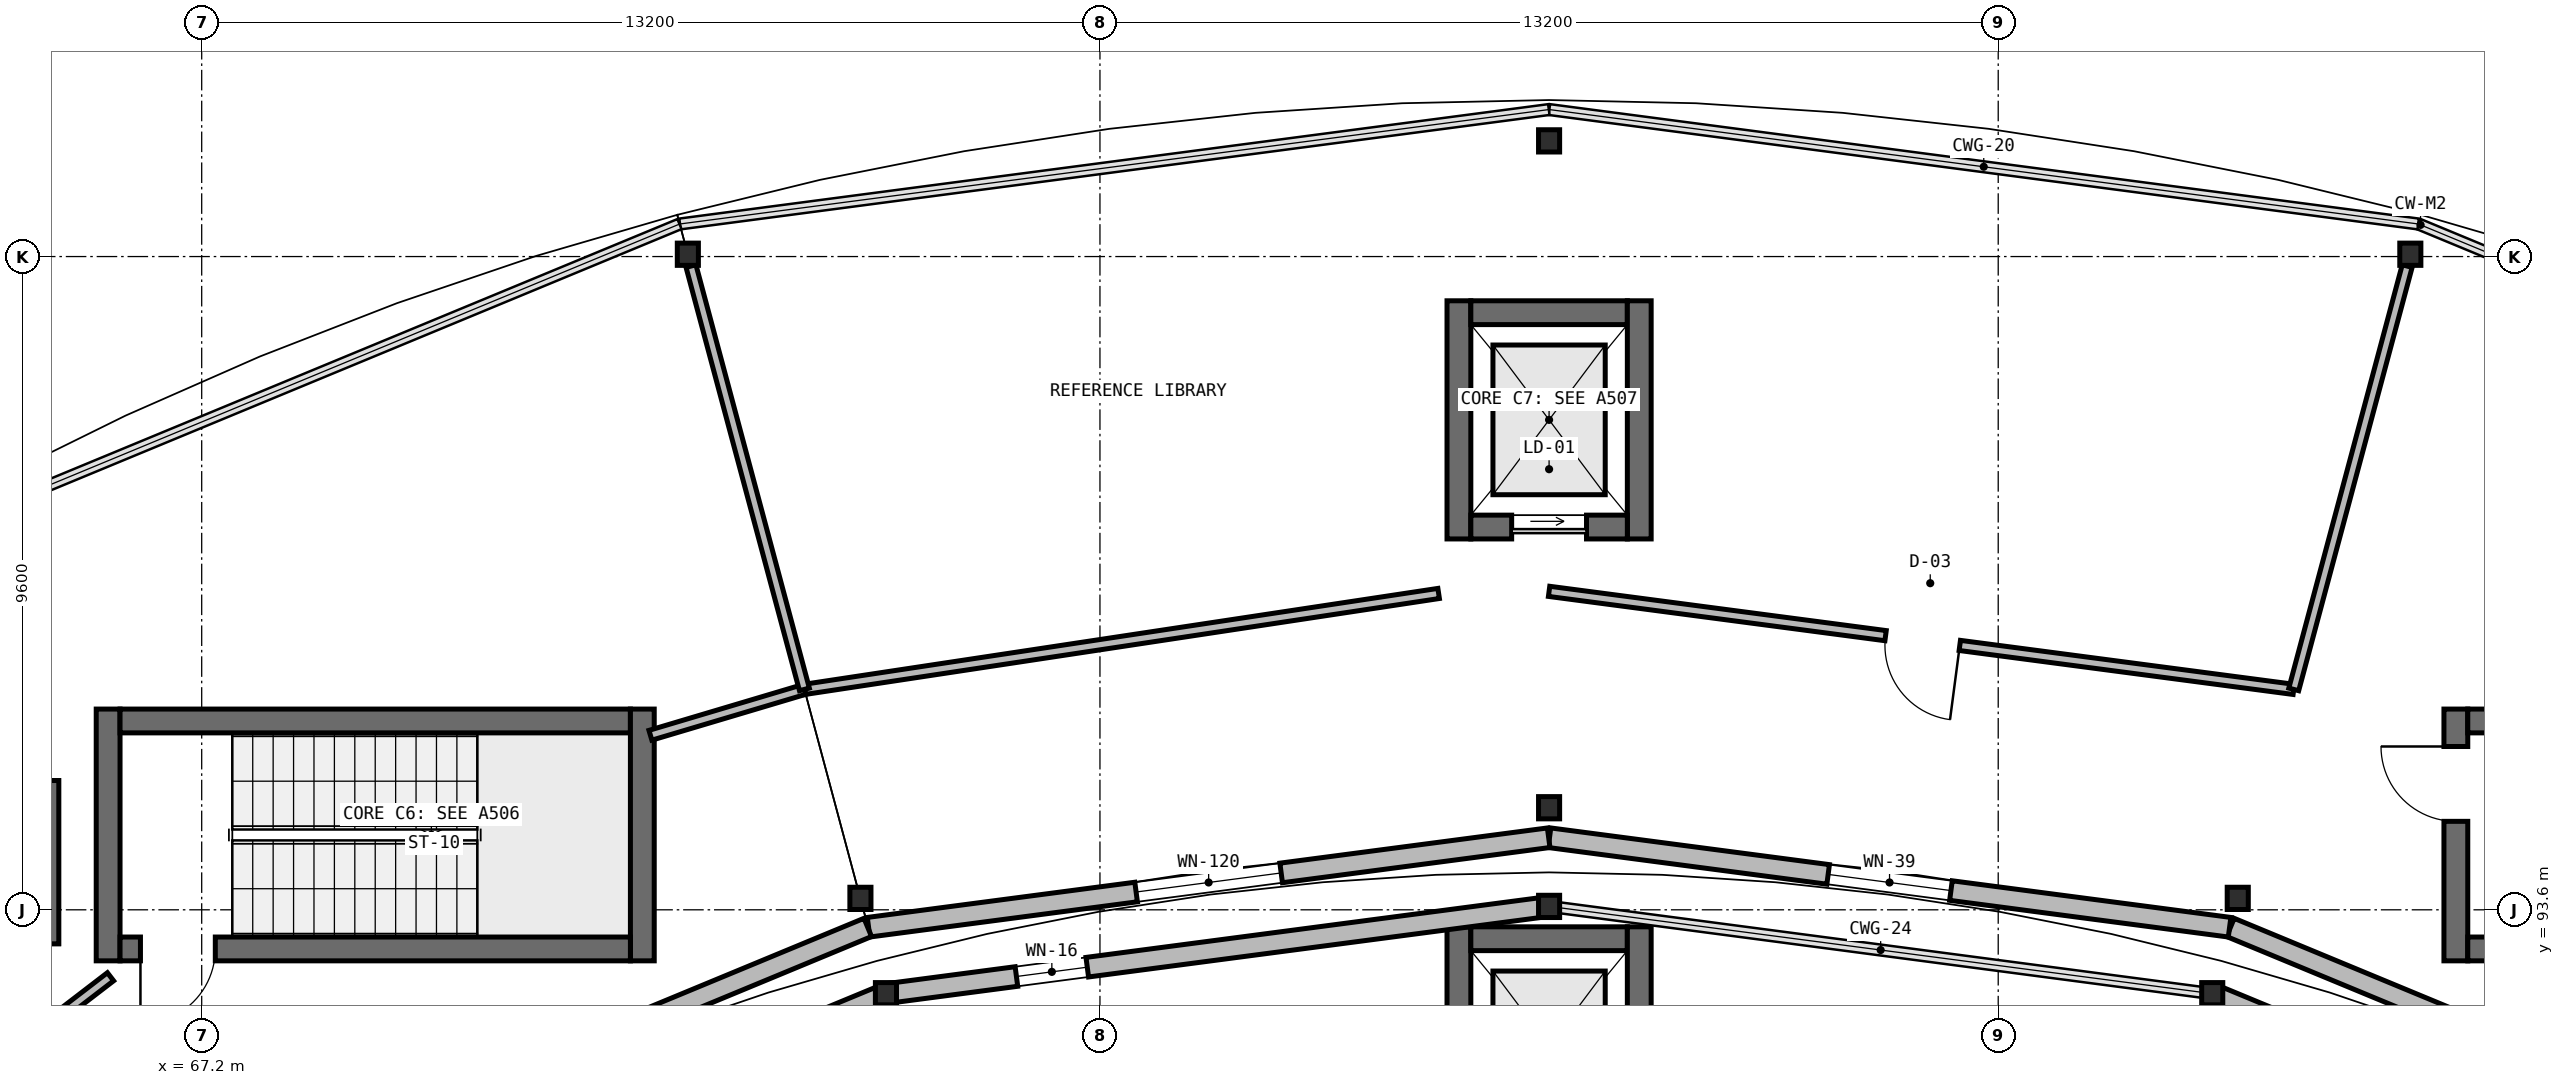
"""IFC4 building model, lengths in metres.
Left out: names, types, materials, properties, quantities, classifications, styles, units other than length and angle.
Written with IfcOpenShell. Run it as: python <this file> out.ifc"""

import sys

from ifc_helpers import new_model, si_unit, direction, frame, frame_2d, origin, origin_2d, place, context, subcontext, project, spatial, rectangle, i_section, extrude, element, fill, save


model = new_model("IFC4")
c1 = context("Model", 3, precision=1e-05, world=origin(), true_north=direction((0.0, 1.0)))
c2 = subcontext(c1, "Body", "Model", "MODEL_VIEW")
j1 = project(units=[si_unit("LENGTHUNIT", "METRE"), si_unit("PLANEANGLEUNIT", "RADIAN")], contexts=[c1])
p1 = place(None, origin())
s1 = spatial("IfcSite", under=j1, at=p1, CompositionType="ELEMENT")
p2 = place(p1, origin())
s2 = spatial("IfcBuilding", under=s1, at=p2, CompositionType="ELEMENT")
p3 = place(p2, frame((0.0, 0.0, 9.8)))
s3 = spatial("IfcBuildingStorey", under=s2, at=p3, CompositionType="ELEMENT", Elevation=9.8)
p4 = place(p3, frame((100.325, 92.85, 0.0), z_axis=(0.0, 0.0, 1.0), x_axis=(0.0, 1.0, 0.0)))
e1 = element("IfcWall", 1, at=p4, inside=s3, PredefinedType="SHEAR", context=c2, shape_type="SweptSolid", body=[
    extrude(rectangle(XDim=3.7, YDim=0.35, at=frame_2d((1.85, 0.0))), origin(), (0.0, 0.0, 1.0), 4.55),
])
p5 = place(p4, frame((2.05, 0.0, 0.0)))
e2 = element("IfcOpeningElement", 2, at=p5, cuts=e1, PredefinedType="OPENING", context=c2, shape_type="SweptSolid", body=[
    extrude(rectangle(XDim=1.1, YDim=2.15, at=frame_2d((0.55, 1.075))), frame((0.0, 0.185, 0.0), z_axis=(0.0, -1.0, 0.0), x_axis=(1.0, 0.0, 0.0)), (0.0, 0.0, 1.0), 0.37),
])
for number, where, z_axis, x_axis in (
    (3, (100.5, 96.375, 0.0), (0.0, 0.0, 1.0), (1.0, 0.0, 0.0)),
    (4, (108.0, 93.025, 0.0), (0.0, 0.0, 1.0), (-1.0, 0.0, 0.0)),
):
    element("IfcWall", number, at=place(p3, frame(where, z_axis=z_axis, x_axis=x_axis)), inside=s3, PredefinedType="SHEAR", context=c2, shape_type="SweptSolid", body=[
        extrude(rectangle(XDim=7.5, YDim=0.35, at=frame_2d((3.75, 0.0))), origin(), (0.0, 0.0, 1.0), 4.55),
    ])
p6 = place(p3, frame((65.825, 92.85, 0.0), z_axis=(0.0, 0.0, 1.0), x_axis=(0.0, 1.0, 0.0)))
e5 = element("IfcWall", 5, at=p6, inside=s3, PredefinedType="SHEAR", context=c2, shape_type="SweptSolid", body=[
    extrude(rectangle(XDim=3.7, YDim=0.35, at=frame_2d((1.85, 0.0))), origin(), (0.0, 0.0, 1.0), 4.55),
])
p7 = place(p3, frame((66.0, 96.375, 0.0), z_axis=(0.0, 0.0, 1.0), x_axis=(1.0, 0.0, 0.0)))
e6 = element("IfcWall", 6, at=p7, inside=s3, PredefinedType="SHEAR", context=c2, shape_type="SweptSolid", body=[
    extrude(rectangle(XDim=7.5, YDim=0.35, at=frame_2d((3.75, 0.0))), origin(), (0.0, 0.0, 1.0), 4.55),
])
p8 = place(p3, frame((73.675, 96.55, 0.0), z_axis=(0.0, 0.0, 1.0), x_axis=(0.0, -1.0, 0.0)))
e7 = element("IfcWall", 7, at=p8, inside=s3, PredefinedType="SHEAR", context=c2, shape_type="SweptSolid", body=[
    extrude(rectangle(XDim=3.7, YDim=0.35, at=frame_2d((1.85, 0.0))), origin(), (0.0, 0.0, 1.0), 4.55),
])
p9 = place(p3, frame((73.5, 93.025, 0.0), z_axis=(0.0, 0.0, 1.0), x_axis=(-1.0, 0.0, 0.0)))
e8 = element("IfcWall", 8, at=p9, inside=s3, PredefinedType="SHEAR", context=c2, shape_type="SweptSolid", body=[
    extrude(rectangle(XDim=7.5, YDim=0.35, at=frame_2d((3.75, 0.0))), origin(), (0.0, 0.0, 1.0), 4.55),
])
p10 = place(p9, frame((6.1, 0.0, 0.0)))
e9 = element("IfcOpeningElement", 9, at=p10, cuts=e8, PredefinedType="OPENING", context=c2, shape_type="SweptSolid", body=[
    extrude(rectangle(XDim=1.1, YDim=2.15, at=frame_2d((0.55, 1.075))), frame((0.0, 0.185, 0.0), z_axis=(0.0, -1.0, 0.0), x_axis=(1.0, 0.0, 0.0)), (0.0, 0.0, 1.0), 0.37),
])
p11 = place(p3, frame((85.675, 89.85, 0.0), z_axis=(0.0, 0.0, 1.0), x_axis=(0.0, 1.0, 0.0)))
e10 = element("IfcWall", 10, at=p11, inside=s3, PredefinedType="SHEAR", context=c2, shape_type="SweptSolid", body=[
    extrude(rectangle(XDim=3.5, YDim=0.35, at=frame_2d((1.75, 0.0))), origin(), (0.0, 0.0, 1.0), 4.55),
])
p12 = place(p3, frame((85.85, 93.175, 0.0), z_axis=(0.0, 0.0, 1.0), x_axis=(1.0, 0.0, 0.0)))
e11 = element("IfcWall", 11, at=p12, inside=s3, PredefinedType="SHEAR", context=c2, shape_type="SweptSolid", body=[
    extrude(rectangle(XDim=2.3, YDim=0.35, at=frame_2d((1.15, 0.0))), origin(), (0.0, 0.0, 1.0), 4.55),
])
for number, where, z_axis, x_axis in (
    (12, (88.325, 93.35, 0.0), (0.0, 0.0, 1.0), (0.0, -1.0, 0.0)),
    (13, (85.675, 99.05, 0.0), (0.0, 0.0, 1.0), (0.0, 1.0, 0.0)),
):
    element("IfcWall", number, at=place(p3, frame(where, z_axis=z_axis, x_axis=x_axis)), inside=s3, PredefinedType="SHEAR", context=c2, shape_type="SweptSolid", body=[
        extrude(rectangle(XDim=3.5, YDim=0.35, at=frame_2d((1.75, 0.0))), origin(), (0.0, 0.0, 1.0), 4.55),
    ])
p13 = place(p3, frame((85.85, 102.375, 0.0), z_axis=(0.0, 0.0, 1.0), x_axis=(1.0, 0.0, 0.0)))
e14 = element("IfcWall", 14, at=p13, inside=s3, PredefinedType="SHEAR", context=c2, shape_type="SweptSolid", body=[
    extrude(rectangle(XDim=2.3, YDim=0.35, at=frame_2d((1.15, 0.0))), origin(), (0.0, 0.0, 1.0), 4.55),
])
p14 = place(p3, frame((88.325, 102.55, 0.0), z_axis=(0.0, 0.0, 1.0), x_axis=(0.0, -1.0, 0.0)))
e15 = element("IfcWall", 15, at=p14, inside=s3, PredefinedType="SHEAR", context=c2, shape_type="SweptSolid", body=[
    extrude(rectangle(XDim=3.5, YDim=0.35, at=frame_2d((1.75, 0.0))), origin(), (0.0, 0.0, 1.0), 4.55),
])
p15 = place(p3, frame((88.15, 99.225, 0.0), z_axis=(0.0, 0.0, 1.0), x_axis=(-1.0, 0.0, 0.0)))
e16 = element("IfcWall", 16, at=p15, inside=s3, PredefinedType="SHEAR", context=c2, shape_type="SweptSolid", body=[
    extrude(rectangle(XDim=2.3, YDim=0.35, at=frame_2d((1.15, 0.0))), origin(), (0.0, 0.0, 1.0), 4.55),
])
p16 = place(p15, frame((0.6, 0.0, 0.0)))
e17 = element("IfcOpeningElement", 17, at=p16, cuts=e16, PredefinedType="OPENING", context=c2, shape_type="SweptSolid", body=[
    extrude(rectangle(XDim=1.1, YDim=2.15, at=frame_2d((0.55, 1.075))), frame((0.0, 0.185, 0.0), z_axis=(0.0, -1.0, 0.0), x_axis=(1.0, 0.0, 0.0)), (0.0, 0.0, 1.0), 0.37),
])
for number, where, z_axis, x_axis in (
    (18, (97.12, 93.768, 0.0), (0.0, 0.0, 1.0), (1.0, 0.0, 0.0)),
    (19, (99.656, 103.234, 0.0), (0.0, 0.0, 1.0), (1.0, 0.0, 0.0)),
    (20, (87.0, 95.1, 0.0), (0.0, 0.0, 1.0), (1.0, 0.0, 0.0)),
    (21, (87.0, 104.9, 0.0), (0.0, 0.0, 1.0), (1.0, 0.0, 0.0)),
    (22, (76.88, 93.768, 0.0), (0.0, 0.0, 1.0), (1.0, 0.0, 0.0)),
    (23, (74.344, 103.234, 0.0), (0.0, 0.0, 1.0), (1.0, 0.0, 0.0)),
    (24, (96.745, 92.367, 0.0), (0.0, 0.0, 1.0), (1.0, 0.0, 0.0)),
    (25, (87.0, 93.65, 0.0), (0.0, 0.0, 1.0), (1.0, 0.0, 0.0)),
    (26, (77.255, 92.367, 0.0), (0.0, 0.0, 1.0), (1.0, 0.0, 0.0)),
):
    element("IfcColumn", number, at=place(p3, frame(where, z_axis=z_axis, x_axis=x_axis)), inside=s3, PredefinedType="COLUMN", context=c2, shape_type="SweptSolid", body=[
        extrude(i_section(OverallWidth=0.31, OverallDepth=0.327, WebThickness=0.016, FlangeThickness=0.025, at=origin_2d()), origin(), (0.0, 0.0, 1.0), 4.55),
    ])
p17 = place(p3, frame((64.95, 95.5, 0.0), z_axis=(0.0, 0.0, 1.0), x_axis=(0.0, -1.0, 0.0)))
e27 = element("IfcWall", 27, at=p17, inside=s3, PredefinedType="SHEAR", context=c2, shape_type="SweptSolid", body=[
    extrude(rectangle(XDim=2.4, YDim=0.3, at=frame_2d((1.2, 0.0))), origin(), (0.0, 0.0, 1.0), 4.37),
])
p18 = place(p3, frame((106.325, 89.483, 0.0), z_axis=(0.0, 0.0, 1.0), x_axis=(-0.92385889973, 0.382733240508, 0.0)))
e28 = element("IfcWall", 28, at=p18, inside=s3, PredefinedType="SOLIDWALL", context=c2, shape_type="SweptSolid", body=[
    extrude(rectangle(XDim=10.081, YDim=0.29, at=frame_2d((5.04, 0.0))), origin(), (0.0, 0.0, 1.0), 4.37),
])
p19 = place(p18, frame((4.295, 0.0, 0.95)))
e29 = element("IfcOpeningElement", 29, at=p19, cuts=e28, PredefinedType="OPENING", context=c2, shape_type="SweptSolid", body=[
    extrude(rectangle(XDim=1.49, YDim=1.59, at=frame_2d((0.745, 0.795))), frame((0.0, 0.155, 0.0), z_axis=(0.0, -1.0, 0.0), x_axis=(1.0, 0.0, 0.0)), (0.0, 0.0, 1.0), 0.31),
])
p20 = place(p3, frame((97.0, 93.344, 0.0), z_axis=(0.0, 0.0, 1.0), x_axis=(-0.991454872597, 0.130450126879, 0.0)))
e30 = element("IfcWall", 30, at=p20, inside=s3, PredefinedType="SOLIDWALL", context=c2, shape_type="SweptSolid", body=[
    extrude(rectangle(XDim=10.08, YDim=0.29, at=frame_2d((5.04, 0.0))), origin(), (0.0, 0.0, 1.0), 3.733),
])
p21 = place(p20, frame((4.13, 0.0, 0.95)))
e31 = element("IfcOpeningElement", 31, at=p21, cuts=e30, PredefinedType="OPENING", context=c2, shape_type="SweptSolid", body=[
    extrude(rectangle(XDim=1.82, YDim=1.51, at=frame_2d((0.91, 0.755))), frame((0.0, 0.155, 0.0), z_axis=(0.0, -1.0, 0.0), x_axis=(1.0, 0.0, 0.0)), (0.0, 0.0, 1.0), 0.31),
])
p22 = place(p3, frame((86.994, 94.659, 0.0), z_axis=(0.0, 0.0, 1.0), x_axis=(-0.991454872597, -0.130450126879, 0.0)))
e32 = element("IfcWall", 32, at=p22, inside=s3, PredefinedType="SOLIDWALL", context=c2, shape_type="SweptSolid", body=[
    extrude(rectangle(XDim=10.08, YDim=0.29, at=frame_2d((5.04, 0.0))), origin(), (0.0, 0.0, 1.0), 3.733),
])
p23 = place(p22, frame((3.965, 0.0, 0.95)))
e33 = element("IfcOpeningElement", 33, at=p23, cuts=e32, PredefinedType="OPENING", context=c2, shape_type="SweptSolid", body=[
    extrude(rectangle(XDim=2.15, YDim=1.43, at=frame_2d((1.075, 0.715))), frame((0.0, 0.155, 0.0), z_axis=(0.0, -1.0, 0.0), x_axis=(1.0, 0.0, 0.0)), (0.0, 0.0, 1.0), 0.31),
])
p24 = place(p3, frame((76.988, 93.341, 0.0), z_axis=(0.0, 0.0, 1.0), x_axis=(-0.92385889973, -0.382733240508, 0.0)))
e34 = element("IfcWall", 34, at=p24, inside=s3, PredefinedType="SOLIDWALL", context=c2, shape_type="SweptSolid", body=[
    extrude(rectangle(XDim=10.081, YDim=0.29, at=frame_2d((5.04, 0.0))), origin(), (0.0, 0.0, 1.0), 4.37),
])
p25 = place(p24, frame((3.8, 0.0, 0.95)))
e35 = element("IfcOpeningElement", 35, at=p25, cuts=e34, PredefinedType="OPENING", context=c2, shape_type="SweptSolid", body=[
    extrude(rectangle(XDim=2.48, YDim=1.35, at=frame_2d((1.24, 0.675))), frame((0.0, 0.155, 0.0), z_axis=(0.0, -1.0, 0.0), x_axis=(1.0, 0.0, 0.0)), (0.0, 0.0, 1.0), 0.31),
])
p26 = place(p3, frame((96.748, 92.366, 0.0), z_axis=(0.0, 0.0, 1.0), x_axis=(0.923848052238, -0.382759423628, 0.0)))
e36 = element("IfcWall", 36, at=p26, inside=s3, PredefinedType="SOLIDWALL", context=c2, shape_type="SweptSolid", body=[
    extrude(rectangle(XDim=9.821, YDim=0.29, at=frame_2d((4.91, 0.0))), origin(), (0.0, 0.0, 1.0), 4.37),
])
p27 = place(p26, frame((1.38, 0.0, 0.95)))
e37 = element("IfcOpeningElement", 37, at=p27, cuts=e36, PredefinedType="OPENING", context=c2, shape_type="SweptSolid", body=[
    extrude(rectangle(XDim=2.15, YDim=1.48, at=frame_2d((1.075, 0.74))), frame((0.0, 0.155, 0.0), z_axis=(0.0, -1.0, 0.0), x_axis=(1.0, 0.0, 0.0)), (0.0, 0.0, 1.0), 0.31),
])
p28 = place(p26, frame((6.291, 0.0, 0.95)))
e38 = element("IfcOpeningElement", 38, at=p28, cuts=e36, PredefinedType="OPENING", context=c2, shape_type="SweptSolid", body=[
    extrude(rectangle(XDim=2.15, YDim=1.48, at=frame_2d((1.075, 0.74))), frame((0.0, 0.155, 0.0), z_axis=(0.0, -1.0, 0.0), x_axis=(1.0, 0.0, 0.0)), (0.0, 0.0, 1.0), 0.31),
])
p29 = place(p3, frame((77.259, 92.368, 0.0), z_axis=(0.0, 0.0, 1.0), x_axis=(0.991456749128, 0.130435863969, 0.0)))
e39 = element("IfcWall", 39, at=p29, inside=s3, PredefinedType="SOLIDWALL", context=c2, shape_type="SweptSolid", body=[
    extrude(rectangle(XDim=9.821, YDim=0.29, at=frame_2d((4.911, 0.0))), origin(), (0.0, 0.0, 1.0), 3.814),
])
p30 = place(p29, frame((1.93, 0.0, 0.95)))
e40 = element("IfcOpeningElement", 40, at=p30, cuts=e39, PredefinedType="OPENING", context=c2, shape_type="SweptSolid", body=[
    extrude(rectangle(XDim=1.05, YDim=1.8, at=frame_2d((0.525, 0.9))), frame((0.0, 0.155, 0.0), z_axis=(0.0, -1.0, 0.0), x_axis=(1.0, 0.0, 0.0)), (0.0, 0.0, 1.0), 0.31),
])
p31 = place(p3, frame((68.179, 88.607, 0.0), z_axis=(0.0, 0.0, 1.0), x_axis=(0.923848052238, 0.382759423628, 0.0)))
e41 = element("IfcWall", 41, at=p31, inside=s3, PredefinedType="SOLIDWALL", context=c2, shape_type="SweptSolid", body=[
    extrude(rectangle(XDim=9.821, YDim=0.29, at=frame_2d((4.91, 0.0))), origin(), (0.0, 0.0, 1.0), 4.37),
])
p32 = place(p31, frame((1.765, 0.0, 0.95)))
e42 = element("IfcOpeningElement", 42, at=p32, cuts=e41, PredefinedType="OPENING", context=c2, shape_type="SweptSolid", body=[
    extrude(rectangle(XDim=1.38, YDim=1.72, at=frame_2d((0.69, 0.86))), frame((0.0, 0.155, 0.0), z_axis=(0.0, -1.0, 0.0), x_axis=(1.0, 0.0, 0.0)), (0.0, 0.0, 1.0), 0.31),
])
p33 = place(p31, frame((6.676, 0.0, 0.95)))
e43 = element("IfcOpeningElement", 43, at=p33, cuts=e41, PredefinedType="OPENING", context=c2, shape_type="SweptSolid", body=[
    extrude(rectangle(XDim=1.38, YDim=1.72, at=frame_2d((0.69, 0.86))), frame((0.0, 0.155, 0.0), z_axis=(0.0, -1.0, 0.0), x_axis=(1.0, 0.0, 0.0)), (0.0, 0.0, 1.0), 0.31),
])
p34 = place(p3, frame((97.943, 96.839, 0.0), z_axis=(0.0, 0.0, 1.0), x_axis=(-0.991442170204, 0.130546632054, 0.0)))
e44 = element("IfcWall", 44, at=p34, inside=s3, PredefinedType="PARTITIONING", context=c2, shape_type="SweptSolid", body=[
    extrude(rectangle(XDim=11.038, YDim=0.15, at=frame_2d((5.519, 0.0))), origin(), (0.0, 0.0, 1.0), 3.737),
])
p35 = place(p34, frame((4.95, 0.0, 0.0)))
e45 = element("IfcOpeningElement", 45, at=p35, cuts=e44, PredefinedType="OPENING", context=c2, shape_type="SweptSolid", body=[
    extrude(rectangle(XDim=1.1, YDim=2.2, at=frame_2d((0.55, 1.1))), frame((0.0, 0.085, 0.0), z_axis=(0.0, -1.0, 0.0), x_axis=(1.0, 0.0, 0.0)), (0.0, 0.0, 1.0), 0.17),
])
p36 = place(p3, frame((85.377, 98.249, 0.0), z_axis=(0.0, 0.0, 1.0), x_axis=(-0.988750352389, -0.149575200656, 0.0)))
e46 = element("IfcWall", 46, at=p36, inside=s3, PredefinedType="PARTITIONING", context=c2, shape_type="SweptSolid", body=[
    extrude(rectangle(XDim=9.426, YDim=0.15, at=frame_2d((4.713, 0.0))), origin(), (0.0, 0.0, 1.0), 3.737),
])
p37 = place(p3, frame((76.057, 96.839, 0.0), z_axis=(0.0, 0.0, 1.0), x_axis=(-0.95838508169, -0.285478607244, 0.0)))
e47 = element("IfcWall", 47, at=p37, inside=s3, PredefinedType="PARTITIONING", context=c2, shape_type="SweptSolid", body=[
    extrude(rectangle(XDim=2.361, YDim=0.15, at=frame_2d((1.181, 0.0))), origin(), (0.0, 0.0, 1.0), 3.737),
])
p38 = place(p3, frame((65.86, 92.616, 0.0), z_axis=(0.0, 0.0, 1.0), x_axis=(-0.793301872689, -0.608828497024, 0.0)))
e48 = element("IfcWall", 48, at=p38, inside=s3, PredefinedType="PARTITIONING", context=c2, shape_type="SweptSolid", body=[
    extrude(rectangle(XDim=11.038, YDim=0.15, at=frame_2d((5.519, 0.0))), origin(), (0.0, 0.0, 1.0), 3.737),
])
p39 = place(p38, frame((4.95, 0.0, 0.0)))
e49 = element("IfcOpeningElement", 49, at=p39, cuts=e48, PredefinedType="OPENING", context=c2, shape_type="SweptSolid", body=[
    extrude(rectangle(XDim=1.1, YDim=2.2, at=frame_2d((0.55, 1.1))), frame((0.0, 0.085, 0.0), z_axis=(0.0, -1.0, 0.0), x_axis=(1.0, 0.0, 0.0)), (0.0, 0.0, 1.0), 0.17),
])
for number, where, z_axis, x_axis in (
    (50, (97.943, 96.839, 0.0), (0.0, 0.0, 1.0), (0.259, 0.966, 0.0)),
    (51, (76.057, 96.839, 0.0), (0.0, 0.0, 1.0), (-0.259, 0.966, 0.0)),
):
    element("IfcWall", number, at=place(p3, frame(where, z_axis=z_axis, x_axis=x_axis)), inside=s3, PredefinedType="PARTITIONING", context=c2, shape_type="SweptSolid", body=[
        extrude(rectangle(XDim=6.44, YDim=0.15, at=frame_2d((3.22, 0.0))), origin(), (0.0, 0.0, 1.0), 3.737),
    ])
p40 = place(p21, origin())
e52 = element("IfcWindow", 52, at=p40, inside=s3, PartitioningType="SINGLE_PANEL", PredefinedType="WINDOW", context=c2, shape_type="SweptSolid", body=[
    extrude(rectangle(XDim=1.82, YDim=1.51, at=frame_2d((0.91, 0.755))), frame((0.0, 0.03, 0.0), z_axis=(0.0, -1.0, 0.0), x_axis=(1.0, 0.0, 0.0)), (0.0, 0.0, 1.0), 0.06),
])
fill(e31, e52)
p41 = place(p23, origin())
e53 = element("IfcWindow", 53, at=p41, inside=s3, PartitioningType="SINGLE_PANEL", PredefinedType="WINDOW", context=c2, shape_type="SweptSolid", body=[
    extrude(rectangle(XDim=2.15, YDim=1.43, at=frame_2d((1.075, 0.715))), frame((0.0, 0.03, 0.0), z_axis=(0.0, -1.0, 0.0), x_axis=(1.0, 0.0, 0.0)), (0.0, 0.0, 1.0), 0.06),
])
fill(e33, e53)
p42 = place(p30, origin())
e54 = element("IfcWindow", 54, at=p42, inside=s3, PartitioningType="SINGLE_PANEL", PredefinedType="WINDOW", context=c2, shape_type="SweptSolid", body=[
    extrude(rectangle(XDim=1.05, YDim=1.8, at=frame_2d((0.525, 0.9))), frame((0.0, 0.03, 0.0), z_axis=(0.0, -1.0, 0.0), x_axis=(1.0, 0.0, 0.0)), (0.0, 0.0, 1.0), 0.06),
])
fill(e40, e54)
p43 = place(p5, origin())
e55 = element("IfcDoor", 55, at=p43, inside=s3, OperationType="SINGLE_SWING_RIGHT", PredefinedType="DOOR", context=c2, shape_type="SweptSolid", body=[
    extrude(rectangle(XDim=1.1, YDim=2.15, at=frame_2d((0.55, 1.075))), frame((0.0, 0.025, 0.0), z_axis=(0.0, -1.0, 0.0), x_axis=(1.0, 0.0, 0.0)), (0.0, 0.0, 1.0), 0.05),
])
fill(e2, e55)
p44 = place(p10, origin())
e56 = element("IfcDoor", 56, at=p44, inside=s3, OperationType="SINGLE_SWING_RIGHT", PredefinedType="DOOR", context=c2, shape_type="SweptSolid", body=[
    extrude(rectangle(XDim=1.1, YDim=2.15, at=frame_2d((0.55, 1.075))), frame((0.0, 0.025, 0.0), z_axis=(0.0, -1.0, 0.0), x_axis=(1.0, 0.0, 0.0)), (0.0, 0.0, 1.0), 0.05),
])
fill(e9, e56)
p45 = place(p16, origin())
e57 = element("IfcDoor", 57, at=p45, inside=s3, OperationType="SLIDING_TO_LEFT", PredefinedType="USERDEFINED", context=c2, shape_type="SweptSolid", body=[
    extrude(rectangle(XDim=1.1, YDim=2.15, at=frame_2d((0.55, 1.075))), frame((0.0, 0.025, 0.0), z_axis=(0.0, -1.0, 0.0), x_axis=(1.0, 0.0, 0.0)), (0.0, 0.0, 1.0), 0.05),
])
fill(e17, e57)
p46 = place(p35, origin())
e58 = element("IfcDoor", 58, at=p46, inside=s3, OperationType="SINGLE_SWING_LEFT", PredefinedType="DOOR", context=c2, shape_type="SweptSolid", body=[
    extrude(rectangle(XDim=1.1, YDim=2.2, at=frame_2d((0.55, 1.1))), frame((0.0, 0.025, 0.0), z_axis=(0.0, -1.0, 0.0), x_axis=(1.0, 0.0, 0.0)), (0.0, 0.0, 1.0), 0.05),
])
fill(e45, e58)
save(model, sys.argv[1])
